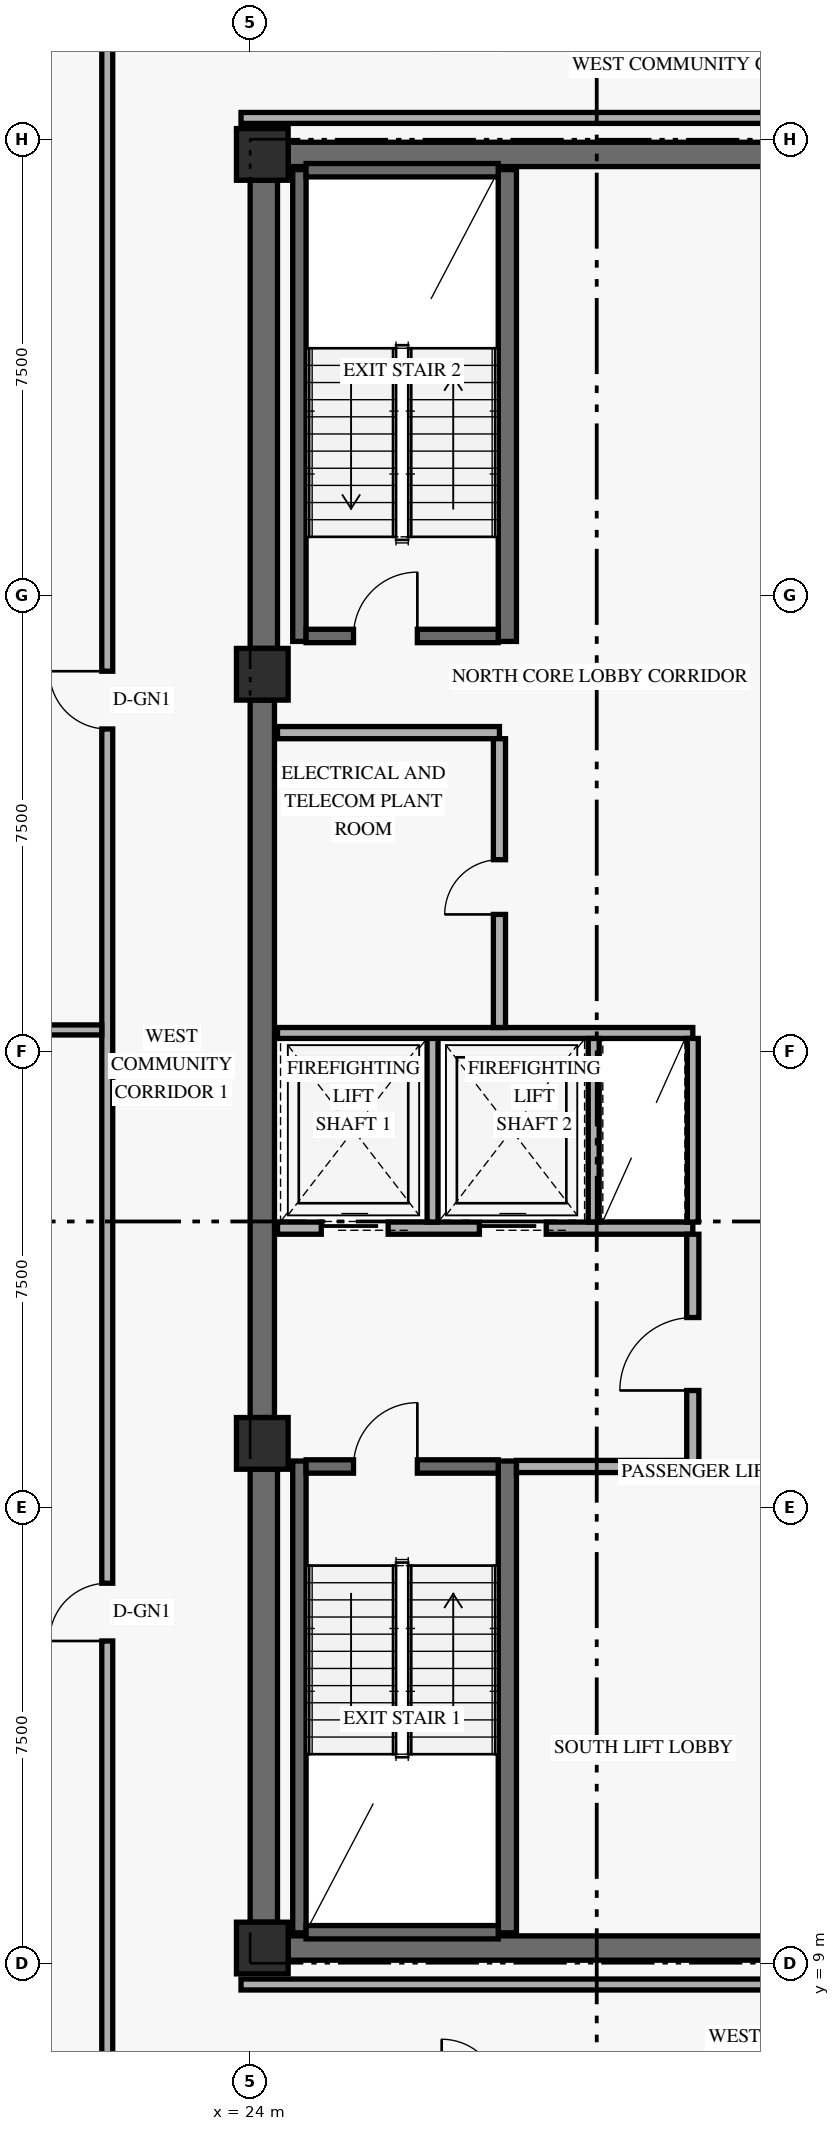
"""IFC4 building model, lengths in metres.
Left out: names, types, materials, properties, quantities, classifications, styles, units other than length and angle.
Written with IfcOpenShell. Run it as: python <this file> out.ifc"""

import sys

from ifc_helpers import new_model, si_unit, direction, frame, frame_2d, origin, origin_2d, place, context, subcontext, project, spatial, rectangle, extrude, element, fill, save


model = new_model("IFC4")
c1 = context("Model", 3, precision=1e-05, world=origin(), true_north=direction((0.0, 1.0)))
c2 = subcontext(c1, "Body", "Model", "MODEL_VIEW")
j1 = project(units=[si_unit("LENGTHUNIT", "METRE"), si_unit("PLANEANGLEUNIT", "RADIAN")], contexts=[c1])
p1 = place(None, origin())
s1 = spatial("IfcSite", under=j1, at=p1, CompositionType="ELEMENT")
p2 = place(p1, origin())
s2 = spatial("IfcBuilding", under=s1, at=p2, CompositionType="ELEMENT")
p3 = place(p2, frame((0.0, 0.0, 117.0)))
s3 = spatial("IfcBuildingStorey", under=s2, at=p3, CompositionType="ELEMENT", Elevation=117.0)
p4 = place(p3, frame((24.225, 9.675, 0.0), z_axis=(0.0, 0.0, 1.0), x_axis=(0.0, 1.0, 0.0)))
e1 = element("IfcWall", 1, at=p4, inside=s3, PredefinedType="SHEAR", context=c2, shape_type="SweptSolid", body=[
    extrude(rectangle(XDim=7.45, YDim=0.45, at=frame_2d((3.725, 0.0))), origin(), (0.0, 0.0, 1.0), 3.349),
])
p5 = place(p3, frame((24.2, 17.975, 0.0), z_axis=(0.0, 0.0, 1.0), x_axis=(0.0, 1.0, 0.0)))
e2 = element("IfcWall", 2, at=p5, inside=s3, PredefinedType="SHEAR", context=c2, shape_type="SweptSolid", body=[
    extrude(rectangle(XDim=11.8, YDim=0.4, at=frame_2d((5.9, 0.0))), origin(), (0.0, 0.0, 1.0), 3.349),
])
p6 = place(p3, frame((24.225, 30.625, 0.0), z_axis=(0.0, 0.0, 1.0), x_axis=(0.0, 1.0, 0.0)))
e3 = element("IfcWall", 3, at=p6, inside=s3, PredefinedType="SHEAR", context=c2, shape_type="SweptSolid", body=[
    extrude(rectangle(XDim=7.7, YDim=0.45, at=frame_2d((3.85, 0.0))), origin(), (0.0, 0.0, 1.0), 3.349),
])
for number, where, z_axis, x_axis in (
    (4, (24.625, 9.25, 0.0), (0.0, 0.0, 1.0), (1.0, 0.0, 0.0)),
    (5, (24.625, 38.75, 0.0), (0.0, 0.0, 1.0), (1.0, 0.0, 0.0)),
):
    element("IfcWall", number, at=place(p3, frame(where, z_axis=z_axis, x_axis=x_axis)), inside=s3, PredefinedType="SHEAR", context=c2, shape_type="SweptSolid", body=[
        extrude(rectangle(XDim=10.15, YDim=0.4, at=frame_2d((5.075, 0.0))), origin(), (0.0, 0.0, 1.0), 3.96),
    ])
p7 = place(p3, frame((24.81, 9.5, 0.0), z_axis=(0.0, 0.0, 1.0), x_axis=(0.0, 1.0, 0.0)))
e6 = element("IfcWall", 6, at=p7, inside=s3, PredefinedType="SHEAR", context=c2, shape_type="SweptSolid", body=[
    extrude(rectangle(XDim=7.76, YDim=0.22, at=frame_2d((3.88, 0.0))), origin(), (0.0, 0.0, 1.0), 3.96),
])
p8 = place(p3, frame((28.23, 9.5, 0.0), z_axis=(0.0, 0.0, 1.0), x_axis=(0.0, 1.0, 0.0)))
e7 = element("IfcWall", 7, at=p8, inside=s3, PredefinedType="SHEAR", context=c2, shape_type="SweptSolid", body=[
    extrude(rectangle(XDim=7.76, YDim=0.3, at=frame_2d((3.88, 0.0))), origin(), (0.0, 0.0, 1.0), 3.96),
])
p9 = place(p3, frame((24.92, 9.51, 0.0), z_axis=(0.0, 0.0, 1.0), x_axis=(1.0, 0.0, 0.0)))
e8 = element("IfcWall", 8, at=p9, inside=s3, PredefinedType="SHEAR", context=c2, shape_type="SweptSolid", body=[
    extrude(rectangle(XDim=3.16, YDim=0.22, at=frame_2d((1.58, 0.0))), origin(), (0.0, 0.0, 1.0), 3.96),
])
p10 = place(p3, frame((24.92, 17.17, 0.0), z_axis=(0.0, 0.0, 1.0), x_axis=(1.0, 0.0, 0.0)))
e9 = element("IfcWall", 9, at=p10, inside=s3, PredefinedType="SHEAR", context=c2, shape_type="SweptSolid", body=[
    extrude(rectangle(XDim=3.16, YDim=0.22, at=frame_2d((1.58, 0.0))), origin(), (0.0, 0.0, 1.0), 3.96),
])
p11 = place(p10, frame((0.78, 0.0, 0.0)))
e10 = element("IfcOpeningElement", 10, at=p11, cuts=e9, PredefinedType="OPENING", context=c2, shape_type="SweptSolid", body=[
    extrude(rectangle(XDim=1.05, YDim=2.15, at=frame_2d((0.525, 1.075))), frame((0.0, 0.12, 0.0), z_axis=(0.0, -1.0, 0.0), x_axis=(1.0, 0.0, 0.0)), (0.0, 0.0, 1.0), 0.24),
])
p12 = place(p3, frame((24.81, 30.74, 0.0), z_axis=(0.0, 0.0, 1.0), x_axis=(0.0, 1.0, 0.0)))
e11 = element("IfcWall", 11, at=p12, inside=s3, PredefinedType="SHEAR", context=c2, shape_type="SweptSolid", body=[
    extrude(rectangle(XDim=7.76, YDim=0.22, at=frame_2d((3.88, 0.0))), origin(), (0.0, 0.0, 1.0), 3.96),
])
p13 = place(p3, frame((28.23, 30.74, 0.0), z_axis=(0.0, 0.0, 1.0), x_axis=(0.0, 1.0, 0.0)))
e12 = element("IfcWall", 12, at=p13, inside=s3, PredefinedType="SHEAR", context=c2, shape_type="SweptSolid", body=[
    extrude(rectangle(XDim=7.76, YDim=0.3, at=frame_2d((3.88, 0.0))), origin(), (0.0, 0.0, 1.0), 3.96),
])
p14 = place(p3, frame((24.92, 30.83, 0.0), z_axis=(0.0, 0.0, 1.0), x_axis=(1.0, 0.0, 0.0)))
e13 = element("IfcWall", 13, at=p14, inside=s3, PredefinedType="SHEAR", context=c2, shape_type="SweptSolid", body=[
    extrude(rectangle(XDim=3.16, YDim=0.22, at=frame_2d((1.58, 0.0))), origin(), (0.0, 0.0, 1.0), 3.96),
])
p15 = place(p14, frame((0.78, 0.0, 0.0)))
e14 = element("IfcOpeningElement", 14, at=p15, cuts=e13, PredefinedType="OPENING", context=c2, shape_type="SweptSolid", body=[
    extrude(rectangle(XDim=1.05, YDim=2.15, at=frame_2d((0.525, 1.075))), frame((0.0, 0.12, 0.0), z_axis=(0.0, -1.0, 0.0), x_axis=(1.0, 0.0, 0.0)), (0.0, 0.0, 1.0), 0.24),
])
p16 = place(p3, frame((24.92, 38.49, 0.0), z_axis=(0.0, 0.0, 1.0), x_axis=(1.0, 0.0, 0.0)))
e15 = element("IfcWall", 15, at=p16, inside=s3, PredefinedType="SHEAR", context=c2, shape_type="SweptSolid", body=[
    extrude(rectangle(XDim=3.16, YDim=0.22, at=frame_2d((1.58, 0.0))), origin(), (0.0, 0.0, 1.0), 3.96),
])
for number, where, z_axis, x_axis in (
    (16, (24.2, 9.25, 0.0), (0.0, 0.0, 1.0), (1.0, 0.0, 0.0)),
    (17, (24.2, 17.55, 0.0), (0.0, 0.0, 1.0), (1.0, 0.0, 0.0)),
    (18, (24.2, 30.2, 0.0), (0.0, 0.0, 1.0), (1.0, 0.0, 0.0)),
    (19, (24.2, 38.75, 0.0), (0.0, 0.0, 1.0), (1.0, 0.0, 0.0)),
):
    element("IfcColumn", number, at=place(p3, frame(where, z_axis=z_axis, x_axis=x_axis)), inside=s3, PredefinedType="COLUMN", context=c2, shape_type="SweptSolid", body=[
        extrude(rectangle(XDim=0.85, YDim=0.85, at=origin_2d()), origin(), (0.0, 0.0, 1.0), 4.2),
    ])
p17 = place(p3, frame((24.45, 21.09, 0.0), z_axis=(0.0, 0.0, 1.0), x_axis=(1.0, 0.0, 0.0)))
e20 = element("IfcWall", 20, at=p17, inside=s3, PredefinedType="STANDARD", context=c2, shape_type="SweptSolid", body=[
    extrude(rectangle(XDim=6.83, YDim=0.2, at=frame_2d((3.415, 0.0))), origin(), (0.0, 0.0, 1.0), 3.96),
])
p18 = place(p17, frame((0.72, 0.0, 0.0)))
e21 = element("IfcOpeningElement", 21, at=p18, cuts=e20, PredefinedType="OPENING", context=c2, shape_type="SweptSolid", body=[
    extrude(rectangle(XDim=1.1, YDim=2.2, at=frame_2d((0.55, 1.1))), frame((0.0, 0.11, 0.0), z_axis=(0.0, -1.0, 0.0), x_axis=(1.0, 0.0, 0.0)), (0.0, 0.0, 1.0), 0.22),
])
p19 = place(p17, frame((3.32, 0.0, 0.0)))
e22 = element("IfcOpeningElement", 22, at=p19, cuts=e20, PredefinedType="OPENING", context=c2, shape_type="SweptSolid", body=[
    extrude(rectangle(XDim=1.1, YDim=2.2, at=frame_2d((0.55, 1.1))), frame((0.0, 0.11, 0.0), z_axis=(0.0, -1.0, 0.0), x_axis=(1.0, 0.0, 0.0)), (0.0, 0.0, 1.0), 0.22),
])
p20 = place(p3, frame((28.38, 17.17, 0.0), z_axis=(0.0, 0.0, 1.0), x_axis=(1.0, 0.0, 0.0)))
e23 = element("IfcWall", 23, at=p20, inside=s3, PredefinedType="STANDARD", context=c2, shape_type="SweptSolid", body=[
    extrude(rectangle(XDim=2.9, YDim=0.2, at=frame_2d((1.45, 0.0))), origin(), (0.0, 0.0, 1.0), 3.96),
])
p21 = place(p3, frame((31.28, 17.07, 0.0), z_axis=(0.0, 0.0, 1.0), x_axis=(0.0, 1.0, 0.0)))
e24 = element("IfcWall", 24, at=p21, inside=s3, PredefinedType="STANDARD", context=c2, shape_type="SweptSolid", body=[
    extrude(rectangle(XDim=3.92, YDim=0.2, at=frame_2d((1.96, 0.0))), origin(), (0.0, 0.0, 1.0), 3.331),
])
p22 = place(p21, frame((1.35, 0.0, 0.0)))
e25 = element("IfcOpeningElement", 25, at=p22, cuts=e24, PredefinedType="OPENING", context=c2, shape_type="SweptSolid", body=[
    extrude(rectangle(XDim=1.2, YDim=2.15, at=frame_2d((0.6, 1.075))), frame((0.0, 0.11, 0.0), z_axis=(0.0, -1.0, 0.0), x_axis=(1.0, 0.0, 0.0)), (0.0, 0.0, 1.0), 0.22),
])
p23 = place(p3, frame((27.0, 21.19, 0.0), z_axis=(0.0, 0.0, 1.0), x_axis=(0.0, 1.0, 0.0)))
e26 = element("IfcWall", 26, at=p23, inside=s3, PredefinedType="STANDARD", context=c2, shape_type="SweptSolid", body=[
    extrude(rectangle(XDim=3.11, YDim=0.18, at=frame_2d((1.555, 0.0))), origin(), (0.0, 0.0, 1.0), 3.96),
])
p24 = place(p3, frame((24.45, 24.3, 0.0), z_axis=(0.0, 0.0, 1.0), x_axis=(1.0, 0.0, 0.0)))
e27 = element("IfcWall", 27, at=p24, inside=s3, PredefinedType="STANDARD", context=c2, shape_type="SweptSolid", body=[
    extrude(rectangle(XDim=6.83, YDim=0.18, at=frame_2d((3.415, 0.0))), origin(), (0.0, 0.0, 1.0), 3.96),
])
for number, where, z_axis, x_axis in (
    (28, (29.65, 21.19, 0.0), (0.0, 0.0, 1.0), (0.0, 1.0, 0.0)),
    (29, (31.28, 21.19, 0.0), (0.0, 0.0, 1.0), (0.0, 1.0, 0.0)),
):
    element("IfcWall", number, at=place(p3, frame(where, z_axis=z_axis, x_axis=x_axis)), inside=s3, PredefinedType="STANDARD", context=c2, shape_type="SweptSolid", body=[
        extrude(rectangle(XDim=3.02, YDim=0.18, at=frame_2d((1.51, 0.0))), origin(), (0.0, 0.0, 1.0), 3.96),
    ])
p25 = place(p3, frame((24.45, 29.24, 0.0), z_axis=(0.0, 0.0, 1.0), x_axis=(1.0, 0.0, 0.0)))
e30 = element("IfcWall", 30, at=p25, inside=s3, PredefinedType="STANDARD", context=c2, shape_type="SweptSolid", body=[
    extrude(rectangle(XDim=3.65, YDim=0.2, at=frame_2d((1.825, 0.0))), origin(), (0.0, 0.0, 1.0), 3.96),
])
p26 = place(p3, frame((28.1, 24.39, 0.0), z_axis=(0.0, 0.0, 1.0), x_axis=(0.0, 1.0, 0.0)))
e31 = element("IfcWall", 31, at=p26, inside=s3, PredefinedType="STANDARD", context=c2, shape_type="SweptSolid", body=[
    extrude(rectangle(XDim=4.75, YDim=0.2, at=frame_2d((2.375, 0.0))), origin(), (0.0, 0.0, 1.0), 3.96),
])
p27 = place(p26, frame((1.86, 0.0, 0.0)))
e32 = element("IfcOpeningElement", 32, at=p27, cuts=e31, PredefinedType="OPENING", context=c2, shape_type="SweptSolid", body=[
    extrude(rectangle(XDim=0.9, YDim=2.1, at=frame_2d((0.45, 1.05))), frame((0.0, 0.11, 0.0), z_axis=(0.0, -1.0, 0.0), x_axis=(1.0, 0.0, 0.0)), (0.0, 0.0, 1.0), 0.22),
])
p28 = place(p3, frame((21.65, 6.8, 0.0), z_axis=(0.0, 0.0, 1.0), x_axis=(0.0, 1.0, 0.0)))
e33 = element("IfcWall", 33, at=p28, inside=s3, PredefinedType="STANDARD", context=c2, shape_type="SweptSolid", body=[
    extrude(rectangle(XDim=34.4, YDim=0.18, at=frame_2d((17.2, 0.0))), origin(), (0.0, 0.0, 1.0), 3.331),
])
p29 = place(p28, frame((7.5, 0.0, 0.0)))
e34 = element("IfcOpeningElement", 34, at=p29, cuts=e33, PredefinedType="OPENING", context=c2, shape_type="SweptSolid", body=[
    extrude(rectangle(XDim=0.95, YDim=2.15, at=frame_2d((0.475, 1.075))), frame((0.0, 0.1, 0.0), z_axis=(0.0, -1.0, 0.0), x_axis=(1.0, 0.0, 0.0)), (0.0, 0.0, 1.0), 0.2),
])
p30 = place(p28, frame((22.5, 0.0, 0.0)))
e35 = element("IfcOpeningElement", 35, at=p30, cuts=e33, PredefinedType="OPENING", context=c2, shape_type="SweptSolid", body=[
    extrude(rectangle(XDim=0.95, YDim=2.15, at=frame_2d((0.475, 1.075))), frame((0.0, 0.1, 0.0), z_axis=(0.0, -1.0, 0.0), x_axis=(1.0, 0.0, 0.0)), (0.0, 0.0, 1.0), 0.2),
])
for number, where, z_axis, x_axis in (
    (36, (23.85, 8.65, 0.0), (0.0, 0.0, 1.0), (1.0, 0.0, 0.0)),
    (37, (23.85, 39.35, 0.0), (0.0, 0.0, 1.0), (1.0, 0.0, 0.0)),
):
    element("IfcWall", number, at=place(p3, frame(where, z_axis=z_axis, x_axis=x_axis)), inside=s3, PredefinedType="STANDARD", context=c2, shape_type="SweptSolid", body=[
        extrude(rectangle(XDim=11.48, YDim=0.18, at=frame_2d((5.74, 0.0))), origin(), (0.0, 0.0, 1.0), 3.331),
    ])
p31 = place(p3, frame((10.08, 24.35, 0.0), z_axis=(0.0, 0.0, 1.0), x_axis=(1.0, 0.0, 0.0)))
e38 = element("IfcWall", 38, at=p31, inside=s3, PredefinedType="PARTITIONING", context=c2, shape_type="SweptSolid", body=[
    extrude(rectangle(XDim=11.48, YDim=0.165, at=frame_2d((5.74, 0.0))), origin(), (0.0, 0.0, 1.0), 3.331),
])
p32 = place(p11, frame((1.05, 0.0, 0.0), z_axis=(0.0, 0.0, 1.0), x_axis=(-1.0, 0.0, 0.0)))
e39 = element("IfcDoor", 39, at=p32, inside=s3, OperationType="SINGLE_SWING_LEFT", PredefinedType="DOOR", context=c2, shape_type="SweptSolid", body=[
    extrude(rectangle(XDim=1.05, YDim=2.15, at=frame_2d((0.525, 1.075))), frame((0.0, 0.025, 0.0), z_axis=(0.0, -1.0, 0.0), x_axis=(1.0, 0.0, 0.0)), (0.0, 0.0, 1.0), 0.05),
])
fill(e10, e39)
p33 = place(p15, origin())
e40 = element("IfcDoor", 40, at=p33, inside=s3, OperationType="SINGLE_SWING_RIGHT", PredefinedType="DOOR", context=c2, shape_type="SweptSolid", body=[
    extrude(rectangle(XDim=1.05, YDim=2.15, at=frame_2d((0.525, 1.075))), frame((0.0, 0.025, 0.0), z_axis=(0.0, -1.0, 0.0), x_axis=(1.0, 0.0, 0.0)), (0.0, 0.0, 1.0), 0.05),
])
fill(e14, e40)
p34 = place(p18, origin())
e41 = element("IfcDoor", 41, at=p34, inside=s3, OperationType="SLIDING_TO_LEFT", PredefinedType="DOOR", context=c2, shape_type="SweptSolid", body=[
    extrude(rectangle(XDim=1.1, YDim=2.2, at=frame_2d((0.55, 1.1))), frame((0.0, 0.025, 0.0), z_axis=(0.0, -1.0, 0.0), x_axis=(1.0, 0.0, 0.0)), (0.0, 0.0, 1.0), 0.05),
])
fill(e21, e41)
p35 = place(p19, origin())
e42 = element("IfcDoor", 42, at=p35, inside=s3, OperationType="SLIDING_TO_LEFT", PredefinedType="DOOR", context=c2, shape_type="SweptSolid", body=[
    extrude(rectangle(XDim=1.1, YDim=2.2, at=frame_2d((0.55, 1.1))), frame((0.0, 0.025, 0.0), z_axis=(0.0, -1.0, 0.0), x_axis=(1.0, 0.0, 0.0)), (0.0, 0.0, 1.0), 0.05),
])
fill(e22, e42)
p36 = place(p22, origin())
e43 = element("IfcDoor", 43, at=p36, inside=s3, OperationType="SINGLE_SWING_LEFT", PredefinedType="DOOR", context=c2, shape_type="SweptSolid", body=[
    extrude(rectangle(XDim=1.2, YDim=2.15, at=frame_2d((0.6, 1.075))), frame((0.0, 0.025, 0.0), z_axis=(0.0, -1.0, 0.0), x_axis=(1.0, 0.0, 0.0)), (0.0, 0.0, 1.0), 0.05),
])
fill(e25, e43)
p37 = place(p27, origin())
e44 = element("IfcDoor", 44, at=p37, inside=s3, OperationType="SINGLE_SWING_LEFT", PredefinedType="DOOR", context=c2, shape_type="SweptSolid", body=[
    extrude(rectangle(XDim=0.9, YDim=2.1, at=frame_2d((0.45, 1.05))), frame((0.0, 0.025, 0.0), z_axis=(0.0, -1.0, 0.0), x_axis=(1.0, 0.0, 0.0)), (0.0, 0.0, 1.0), 0.05),
])
fill(e32, e44)
p38 = place(p29, origin())
e45 = element("IfcDoor", 45, at=p38, inside=s3, OperationType="SINGLE_SWING_LEFT", PredefinedType="DOOR", context=c2, shape_type="SweptSolid", body=[
    extrude(rectangle(XDim=0.95, YDim=2.15, at=frame_2d((0.475, 1.075))), frame((0.0, 0.025, 0.0), z_axis=(0.0, -1.0, 0.0), x_axis=(1.0, 0.0, 0.0)), (0.0, 0.0, 1.0), 0.05),
])
fill(e34, e45)
p39 = place(p30, origin())
e46 = element("IfcDoor", 46, at=p39, inside=s3, OperationType="SINGLE_SWING_RIGHT", PredefinedType="DOOR", context=c2, shape_type="SweptSolid", body=[
    extrude(rectangle(XDim=0.95, YDim=2.15, at=frame_2d((0.475, 1.075))), frame((0.0, 0.025, 0.0), z_axis=(0.0, -1.0, 0.0), x_axis=(1.0, 0.0, 0.0)), (0.0, 0.0, 1.0), 0.05),
])
fill(e35, e46)
save(model, sys.argv[1])
